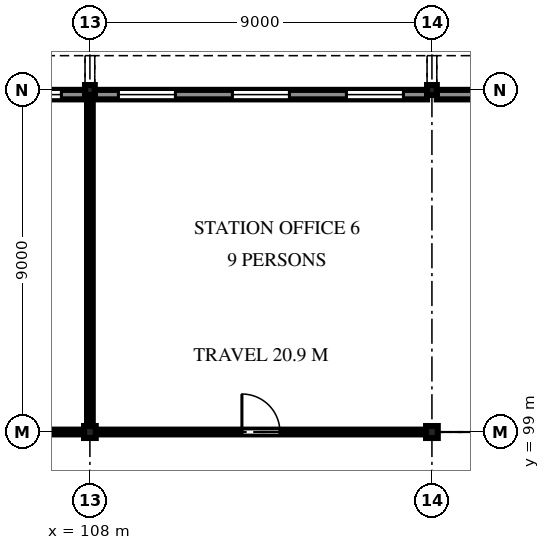
"""IFC4 building model, lengths in metres.
Left out: names, types, materials, properties, quantities, classifications, styles, units other than length and angle.
Written with IfcOpenShell. Run it as: python <this file> out.ifc"""

import sys

from ifc_helpers import new_model, si_unit, direction, frame, frame_2d, origin, origin_2d, place, context, subcontext, project, spatial, polyline, rectangle, i_section, outline, extrude, element, fill, save


model = new_model("IFC4")
c1 = context("Model", 3, precision=1e-05, world=origin(), true_north=direction((0.0, 1.0)))
c2 = subcontext(c1, "Body", "Model", "MODEL_VIEW")
j1 = project(units=[si_unit("LENGTHUNIT", "METRE"), si_unit("PLANEANGLEUNIT", "RADIAN")], contexts=[c1])
p1 = place(None, origin())
s1 = spatial("IfcSite", under=j1, at=p1, CompositionType="ELEMENT")
p2 = place(p1, origin())
s2 = spatial("IfcBuilding", under=s1, at=p2, CompositionType="ELEMENT")
p3 = place(p2, frame((0.0, 0.0, 7.5)))
s3 = spatial("IfcBuildingStorey", under=s2, at=p3, CompositionType="ELEMENT", Elevation=7.5)
p4 = place(p3, frame((108.0, 99.0, 0.0), z_axis=(0.0, 0.0, 1.0), x_axis=(1.0, 0.0, 0.0)))
e1 = element("IfcColumn", 1, at=p4, inside=s3, PredefinedType="COLUMN", context=c2, shape_type="SweptSolid", body=[
    extrude(i_section(OverallWidth=0.307, OverallDepth=0.314, WebThickness=0.012, FlangeThickness=0.019, FilletRadius=0.015, at=origin_2d()), origin(), (0.0, 0.0, 1.0), 4.2),
])
p5 = place(p3, frame((108.0, 108.0, 0.0), z_axis=(0.0, 0.0, 1.0), x_axis=(1.0, 0.0, 0.0)))
e2 = element("IfcColumn", 2, at=p5, inside=s3, PredefinedType="COLUMN", context=c2, shape_type="SweptSolid", body=[
    extrude(i_section(OverallWidth=0.256, OverallDepth=0.26, WebThickness=0.01, FlangeThickness=0.017, FilletRadius=0.013, at=origin_2d()), origin(), (0.0, 0.0, 1.0), 4.2),
])
p6 = place(p3, frame((117.0, 99.0, 0.0), z_axis=(0.0, 0.0, 1.0), x_axis=(1.0, 0.0, 0.0)))
e3 = element("IfcColumn", 3, at=p6, inside=s3, PredefinedType="COLUMN", context=c2, shape_type="SweptSolid", body=[
    extrude(i_section(OverallWidth=0.307, OverallDepth=0.314, WebThickness=0.012, FlangeThickness=0.019, FilletRadius=0.015, at=origin_2d()), origin(), (0.0, 0.0, 1.0), 4.2),
])
p7 = place(p3, frame((117.0, 108.0, 0.0), z_axis=(0.0, 0.0, 1.0), x_axis=(1.0, 0.0, 0.0)))
e4 = element("IfcColumn", 4, at=p7, inside=s3, PredefinedType="COLUMN", context=c2, shape_type="SweptSolid", body=[
    extrude(i_section(OverallWidth=0.256, OverallDepth=0.26, WebThickness=0.01, FlangeThickness=0.017, FilletRadius=0.013, at=origin_2d()), origin(), (0.0, 0.0, 1.0), 4.2),
])
p8 = place(p3, frame((99.128, 107.878, 0.0), z_axis=(0.0, 0.0, 1.0), x_axis=(1.0, 0.0, 0.0)))
e5 = element("IfcWall", 5, at=p8, inside=s3, PredefinedType="SOLIDWALL", context=c2, shape_type="SweptSolid", body=[
    extrude(rectangle(XDim=8.744, YDim=0.25, at=frame_2d((4.372, 0.0))), origin(), (0.0, 0.0, 1.0), 4.05),
])
p9 = place(p8, frame((0.622, 0.0, 0.9)))
e6 = element("IfcOpeningElement", 6, at=p9, cuts=e5, PredefinedType="OPENING", context=c2, shape_type="SweptSolid", body=[
    extrude(rectangle(XDim=1.5, YDim=2.4, at=frame_2d((0.75, 1.2))), frame((0.0, 0.135, 0.0), z_axis=(0.0, -1.0, 0.0), x_axis=(1.0, 0.0, 0.0)), (0.0, 0.0, 1.0), 0.27),
])
p10 = place(p8, frame((3.622, 0.0, 0.9)))
e7 = element("IfcOpeningElement", 7, at=p10, cuts=e5, PredefinedType="OPENING", context=c2, shape_type="SweptSolid", body=[
    extrude(rectangle(XDim=1.5, YDim=2.4, at=frame_2d((0.75, 1.2))), frame((0.0, 0.135, 0.0), z_axis=(0.0, -1.0, 0.0), x_axis=(1.0, 0.0, 0.0)), (0.0, 0.0, 1.0), 0.27),
])
p11 = place(p8, frame((6.622, 0.0, 0.9)))
e8 = element("IfcOpeningElement", 8, at=p11, cuts=e5, PredefinedType="OPENING", context=c2, shape_type="SweptSolid", body=[
    extrude(rectangle(XDim=1.5, YDim=2.4, at=frame_2d((0.75, 1.2))), frame((0.0, 0.135, 0.0), z_axis=(0.0, -1.0, 0.0), x_axis=(1.0, 0.0, 0.0)), (0.0, 0.0, 1.0), 0.27),
])
p12 = place(p3, frame((108.128, 107.878, 0.0), z_axis=(0.0, 0.0, 1.0), x_axis=(1.0, 0.0, 0.0)))
e9 = element("IfcWall", 9, at=p12, inside=s3, PredefinedType="SOLIDWALL", context=c2, shape_type="SweptSolid", body=[
    extrude(rectangle(XDim=8.744, YDim=0.25, at=frame_2d((4.372, 0.0))), origin(), (0.0, 0.0, 1.0), 4.05),
])
p13 = place(p12, frame((0.622, 0.0, 0.9)))
e10 = element("IfcOpeningElement", 10, at=p13, cuts=e9, PredefinedType="OPENING", context=c2, shape_type="SweptSolid", body=[
    extrude(rectangle(XDim=1.5, YDim=2.4, at=frame_2d((0.75, 1.2))), frame((0.0, 0.135, 0.0), z_axis=(0.0, -1.0, 0.0), x_axis=(1.0, 0.0, 0.0)), (0.0, 0.0, 1.0), 0.27),
])
p14 = place(p12, frame((3.622, 0.0, 0.9)))
e11 = element("IfcOpeningElement", 11, at=p14, cuts=e9, PredefinedType="OPENING", context=c2, shape_type="SweptSolid", body=[
    extrude(rectangle(XDim=1.5, YDim=2.4, at=frame_2d((0.75, 1.2))), frame((0.0, 0.135, 0.0), z_axis=(0.0, -1.0, 0.0), x_axis=(1.0, 0.0, 0.0)), (0.0, 0.0, 1.0), 0.27),
])
p15 = place(p12, frame((6.622, 0.0, 0.9)))
e12 = element("IfcOpeningElement", 12, at=p15, cuts=e9, PredefinedType="OPENING", context=c2, shape_type="SweptSolid", body=[
    extrude(rectangle(XDim=1.5, YDim=2.4, at=frame_2d((0.75, 1.2))), frame((0.0, 0.135, 0.0), z_axis=(0.0, -1.0, 0.0), x_axis=(1.0, 0.0, 0.0)), (0.0, 0.0, 1.0), 0.27),
])
p16 = place(p3, frame((117.128, 107.878, 0.0), z_axis=(0.0, 0.0, 1.0), x_axis=(1.0, 0.0, 0.0)))
e13 = element("IfcWall", 13, at=p16, inside=s3, PredefinedType="SOLIDWALL", context=c2, shape_type="SweptSolid", body=[
    extrude(rectangle(XDim=8.744, YDim=0.25, at=frame_2d((4.372, 0.0))), origin(), (0.0, 0.0, 1.0), 4.05),
])
p17 = place(p16, frame((3.922, 0.0, 1.2)))
e14 = element("IfcOpeningElement", 14, at=p17, cuts=e13, PredefinedType="OPENING", context=c2, shape_type="SweptSolid", body=[
    extrude(rectangle(XDim=0.9, YDim=1.8, at=frame_2d((0.45, 0.9))), frame((0.0, 0.135, 0.0), z_axis=(0.0, -1.0, 0.0), x_axis=(1.0, 0.0, 0.0)), (0.0, 0.0, 1.0), 0.27),
])
p18 = place(p3, frame((108.154, 99.0, 0.0), z_axis=(0.0, 0.0, 1.0), x_axis=(1.0, 0.0, 0.0)))
e15 = element("IfcWall", 15, at=p18, inside=s3, PredefinedType="PARTITIONING", context=c2, shape_type="SweptSolid", body=[
    extrude(rectangle(XDim=8.692, YDim=0.125, at=frame_2d((4.346, 0.0))), origin(), (0.0, 0.0, 1.0), 3.307),
])
p19 = place(p18, frame((3.846, 0.0, 0.0)))
e16 = element("IfcOpeningElement", 16, at=p19, cuts=e15, PredefinedType="OPENING", context=c2, shape_type="SweptSolid", body=[
    extrude(rectangle(XDim=1.0, YDim=2.1, at=frame_2d((0.5, 1.05))), frame((0.0, 0.073, 0.0), z_axis=(0.0, -1.0, 0.0), x_axis=(1.0, 0.0, 0.0)), (0.0, 0.0, 1.0), 0.145),
])
p20 = place(p3, frame((99.154, 99.0, 0.0), z_axis=(0.0, 0.0, 1.0), x_axis=(1.0, 0.0, 0.0)))
e17 = element("IfcWall", 17, at=p20, inside=s3, PredefinedType="PARTITIONING", context=c2, shape_type="SweptSolid", body=[
    extrude(rectangle(XDim=8.692, YDim=0.125, at=frame_2d((4.346, 0.0))), origin(), (0.0, 0.0, 1.0), 3.307),
])
p21 = place(p20, frame((3.746, 0.0, 0.0)))
e18 = element("IfcOpeningElement", 18, at=p21, cuts=e17, PredefinedType="OPENING", context=c2, shape_type="SweptSolid", body=[
    extrude(rectangle(XDim=1.2, YDim=2.1, at=frame_2d((0.6, 1.05))), frame((0.0, 0.073, 0.0), z_axis=(0.0, -1.0, 0.0), x_axis=(1.0, 0.0, 0.0)), (0.0, 0.0, 1.0), 0.145),
])
p22 = place(p3, frame((108.0, 107.87, 0.0), z_axis=(0.0, 0.0, 1.0), x_axis=(0.0, -1.0, 0.0)))
e19 = element("IfcWall", 19, at=p22, inside=s3, PredefinedType="PARTITIONING", context=c2, shape_type="SweptSolid", body=[
    extrude(rectangle(XDim=8.713, YDim=0.15, at=frame_2d((4.356, 0.0))), origin(), (0.0, 0.0, 1.0), 3.307),
])
p23 = place(p11, origin())
e20 = element("IfcWindow", 20, at=p23, inside=s3, PartitioningType="DOUBLE_PANEL_VERTICAL", PredefinedType="WINDOW", context=c2, shape_type="SweptSolid", body=[
    extrude(outline(polyline([(0.0, 0.0), (1.5, 0.0), (1.5, 2.4), (0.0, 2.4), (0.0, 0.0)]), holes=[polyline([(0.07, 0.07), (1.43, 0.07), (1.43, 2.33), (0.07, 2.33), (0.07, 0.07)])]), frame((0.0, 0.03, 0.0), z_axis=(0.0, -1.0, 0.0), x_axis=(1.0, 0.0, 0.0)), (0.0, 0.0, 1.0), 0.06),
    extrude(rectangle(XDim=0.04, YDim=2.26, at=frame_2d((0.75, 1.2))), frame((0.0, 0.022, 0.0), z_axis=(0.0, -1.0, 0.0), x_axis=(1.0, 0.0, 0.0)), (0.0, 0.0, 1.0), 0.044),
    extrude(outline(polyline([(0.07, 0.07), (0.73, 0.07), (0.73, 2.33), (0.07, 2.33), (0.07, 0.07)]), holes=[polyline([(0.1, 0.1), (0.7, 0.1), (0.7, 2.3), (0.1, 2.3), (0.1, 0.1)])]), frame((0.0, 0.022, 0.0), z_axis=(0.0, -1.0, 0.0), x_axis=(1.0, 0.0, 0.0)), (0.0, 0.0, 1.0), 0.045),
    extrude(rectangle(XDim=0.6, YDim=2.2, at=frame_2d((0.4, 1.2))), frame((0.0, 0.006, 0.0), z_axis=(0.0, -1.0, 0.0), x_axis=(1.0, 0.0, 0.0)), (0.0, 0.0, 1.0), 0.012),
    extrude(outline(polyline([(0.77, 0.07), (1.43, 0.07), (1.43, 2.33), (0.77, 2.33), (0.77, 0.07)]), holes=[polyline([(0.8, 0.1), (1.4, 0.1), (1.4, 2.3), (0.8, 2.3), (0.8, 0.1)])]), frame((0.0, 0.022, 0.0), z_axis=(0.0, -1.0, 0.0), x_axis=(1.0, 0.0, 0.0)), (0.0, 0.0, 1.0), 0.045),
    extrude(rectangle(XDim=0.6, YDim=2.2, at=frame_2d((1.1, 1.2))), frame((0.0, 0.006, 0.0), z_axis=(0.0, -1.0, 0.0), x_axis=(1.0, 0.0, 0.0)), (0.0, 0.0, 1.0), 0.012),
])
fill(e8, e20)
p24 = place(p13, origin())
e21 = element("IfcWindow", 21, at=p24, inside=s3, PartitioningType="DOUBLE_PANEL_VERTICAL", PredefinedType="WINDOW", context=c2, shape_type="SweptSolid", body=[
    extrude(outline(polyline([(0.0, 0.0), (1.5, 0.0), (1.5, 2.4), (0.0, 2.4), (0.0, 0.0)]), holes=[polyline([(0.07, 0.07), (1.43, 0.07), (1.43, 2.33), (0.07, 2.33), (0.07, 0.07)])]), frame((0.0, 0.03, 0.0), z_axis=(0.0, -1.0, 0.0), x_axis=(1.0, 0.0, 0.0)), (0.0, 0.0, 1.0), 0.06),
    extrude(rectangle(XDim=0.04, YDim=2.26, at=frame_2d((0.75, 1.2))), frame((0.0, 0.022, 0.0), z_axis=(0.0, -1.0, 0.0), x_axis=(1.0, 0.0, 0.0)), (0.0, 0.0, 1.0), 0.044),
    extrude(outline(polyline([(0.07, 0.07), (0.73, 0.07), (0.73, 2.33), (0.07, 2.33), (0.07, 0.07)]), holes=[polyline([(0.1, 0.1), (0.7, 0.1), (0.7, 2.3), (0.1, 2.3), (0.1, 0.1)])]), frame((0.0, 0.022, 0.0), z_axis=(0.0, -1.0, 0.0), x_axis=(1.0, 0.0, 0.0)), (0.0, 0.0, 1.0), 0.045),
    extrude(rectangle(XDim=0.6, YDim=2.2, at=frame_2d((0.4, 1.2))), frame((0.0, 0.006, 0.0), z_axis=(0.0, -1.0, 0.0), x_axis=(1.0, 0.0, 0.0)), (0.0, 0.0, 1.0), 0.012),
    extrude(outline(polyline([(0.77, 0.07), (1.43, 0.07), (1.43, 2.33), (0.77, 2.33), (0.77, 0.07)]), holes=[polyline([(0.8, 0.1), (1.4, 0.1), (1.4, 2.3), (0.8, 2.3), (0.8, 0.1)])]), frame((0.0, 0.022, 0.0), z_axis=(0.0, -1.0, 0.0), x_axis=(1.0, 0.0, 0.0)), (0.0, 0.0, 1.0), 0.045),
    extrude(rectangle(XDim=0.6, YDim=2.2, at=frame_2d((1.1, 1.2))), frame((0.0, 0.006, 0.0), z_axis=(0.0, -1.0, 0.0), x_axis=(1.0, 0.0, 0.0)), (0.0, 0.0, 1.0), 0.012),
])
fill(e10, e21)
p25 = place(p14, origin())
e22 = element("IfcWindow", 22, at=p25, inside=s3, PartitioningType="DOUBLE_PANEL_VERTICAL", PredefinedType="WINDOW", context=c2, shape_type="SweptSolid", body=[
    extrude(outline(polyline([(0.0, 0.0), (1.5, 0.0), (1.5, 2.4), (0.0, 2.4), (0.0, 0.0)]), holes=[polyline([(0.07, 0.07), (1.43, 0.07), (1.43, 2.33), (0.07, 2.33), (0.07, 0.07)])]), frame((0.0, 0.03, 0.0), z_axis=(0.0, -1.0, 0.0), x_axis=(1.0, 0.0, 0.0)), (0.0, 0.0, 1.0), 0.06),
    extrude(rectangle(XDim=0.04, YDim=2.26, at=frame_2d((0.75, 1.2))), frame((0.0, 0.022, 0.0), z_axis=(0.0, -1.0, 0.0), x_axis=(1.0, 0.0, 0.0)), (0.0, 0.0, 1.0), 0.044),
    extrude(outline(polyline([(0.07, 0.07), (0.73, 0.07), (0.73, 2.33), (0.07, 2.33), (0.07, 0.07)]), holes=[polyline([(0.1, 0.1), (0.7, 0.1), (0.7, 2.3), (0.1, 2.3), (0.1, 0.1)])]), frame((0.0, 0.022, 0.0), z_axis=(0.0, -1.0, 0.0), x_axis=(1.0, 0.0, 0.0)), (0.0, 0.0, 1.0), 0.045),
    extrude(rectangle(XDim=0.6, YDim=2.2, at=frame_2d((0.4, 1.2))), frame((0.0, 0.006, 0.0), z_axis=(0.0, -1.0, 0.0), x_axis=(1.0, 0.0, 0.0)), (0.0, 0.0, 1.0), 0.012),
    extrude(outline(polyline([(0.77, 0.07), (1.43, 0.07), (1.43, 2.33), (0.77, 2.33), (0.77, 0.07)]), holes=[polyline([(0.8, 0.1), (1.4, 0.1), (1.4, 2.3), (0.8, 2.3), (0.8, 0.1)])]), frame((0.0, 0.022, 0.0), z_axis=(0.0, -1.0, 0.0), x_axis=(1.0, 0.0, 0.0)), (0.0, 0.0, 1.0), 0.045),
    extrude(rectangle(XDim=0.6, YDim=2.2, at=frame_2d((1.1, 1.2))), frame((0.0, 0.006, 0.0), z_axis=(0.0, -1.0, 0.0), x_axis=(1.0, 0.0, 0.0)), (0.0, 0.0, 1.0), 0.012),
])
fill(e11, e22)
p26 = place(p15, origin())
e23 = element("IfcWindow", 23, at=p26, inside=s3, PartitioningType="DOUBLE_PANEL_VERTICAL", PredefinedType="WINDOW", context=c2, shape_type="SweptSolid", body=[
    extrude(outline(polyline([(0.0, 0.0), (1.5, 0.0), (1.5, 2.4), (0.0, 2.4), (0.0, 0.0)]), holes=[polyline([(0.07, 0.07), (1.43, 0.07), (1.43, 2.33), (0.07, 2.33), (0.07, 0.07)])]), frame((0.0, 0.03, 0.0), z_axis=(0.0, -1.0, 0.0), x_axis=(1.0, 0.0, 0.0)), (0.0, 0.0, 1.0), 0.06),
    extrude(rectangle(XDim=0.04, YDim=2.26, at=frame_2d((0.75, 1.2))), frame((0.0, 0.022, 0.0), z_axis=(0.0, -1.0, 0.0), x_axis=(1.0, 0.0, 0.0)), (0.0, 0.0, 1.0), 0.044),
    extrude(outline(polyline([(0.07, 0.07), (0.73, 0.07), (0.73, 2.33), (0.07, 2.33), (0.07, 0.07)]), holes=[polyline([(0.1, 0.1), (0.7, 0.1), (0.7, 2.3), (0.1, 2.3), (0.1, 0.1)])]), frame((0.0, 0.022, 0.0), z_axis=(0.0, -1.0, 0.0), x_axis=(1.0, 0.0, 0.0)), (0.0, 0.0, 1.0), 0.045),
    extrude(rectangle(XDim=0.6, YDim=2.2, at=frame_2d((0.4, 1.2))), frame((0.0, 0.006, 0.0), z_axis=(0.0, -1.0, 0.0), x_axis=(1.0, 0.0, 0.0)), (0.0, 0.0, 1.0), 0.012),
    extrude(outline(polyline([(0.77, 0.07), (1.43, 0.07), (1.43, 2.33), (0.77, 2.33), (0.77, 0.07)]), holes=[polyline([(0.8, 0.1), (1.4, 0.1), (1.4, 2.3), (0.8, 2.3), (0.8, 0.1)])]), frame((0.0, 0.022, 0.0), z_axis=(0.0, -1.0, 0.0), x_axis=(1.0, 0.0, 0.0)), (0.0, 0.0, 1.0), 0.045),
    extrude(rectangle(XDim=0.6, YDim=2.2, at=frame_2d((1.1, 1.2))), frame((0.0, 0.006, 0.0), z_axis=(0.0, -1.0, 0.0), x_axis=(1.0, 0.0, 0.0)), (0.0, 0.0, 1.0), 0.012),
])
fill(e12, e23)
p27 = place(p19, origin())
e24 = element("IfcDoor", 24, at=p27, inside=s3, OperationType="SINGLE_SWING_LEFT", PredefinedType="DOOR", context=c2, shape_type="SweptSolid", body=[
    extrude(outline(polyline([(0.0, 0.0), (0.07, 0.0), (0.07, 2.03), (0.93, 2.03), (0.93, 0.0), (1.0, 0.0), (1.0, 2.1), (0.0, 2.1), (0.0, 0.0)])), frame((0.0, 0.025, 0.0), z_axis=(0.0, -1.0, 0.0), x_axis=(1.0, 0.0, 0.0)), (0.0, 0.0, 1.0), 0.05),
    extrude(outline(polyline([(0.074, 0.01), (0.926, 0.01), (0.926, 2.026), (0.074, 2.026), (0.074, 0.01)]), holes=[polyline([(0.194, 0.16), (0.806, 0.16), (0.806, 1.01), (0.194, 1.01), (0.194, 0.16)]), polyline([(0.35, 1.16), (0.65, 1.16), (0.65, 1.76), (0.35, 1.76), (0.35, 1.16)])]), frame((0.0, 0.017, 0.0), z_axis=(0.0, -1.0, 0.0), x_axis=(1.0, 0.0, 0.0)), (0.0, 0.0, 1.0), 0.035),
    extrude(rectangle(XDim=0.612, YDim=0.85, at=frame_2d((0.5, 0.585))), frame((0.0, 0.009, 0.0), z_axis=(0.0, -1.0, 0.0), x_axis=(1.0, 0.0, 0.0)), (0.0, 0.0, 1.0), 0.017),
    extrude(rectangle(XDim=0.3, YDim=0.6, at=frame_2d((0.5, 1.46))), frame((0.0, 0.006, 0.0), z_axis=(0.0, -1.0, 0.0), x_axis=(1.0, 0.0, 0.0)), (0.0, 0.0, 1.0), 0.012),
])
fill(e16, e24)
save(model, sys.argv[1])
